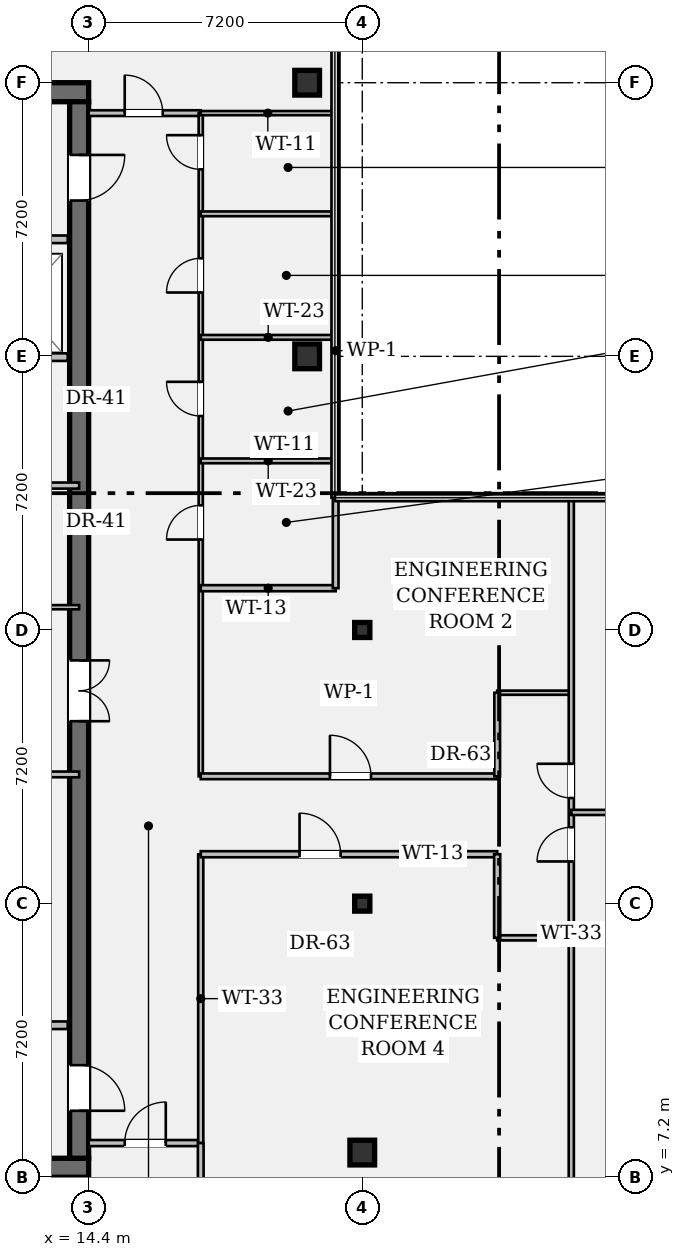
"""IFC4 building model, lengths in metres.
Left out: names, types, materials, properties, quantities, classifications, styles, units other than length and angle.
Written with IfcOpenShell. Run it as: python <this file> out.ifc"""

import sys

from ifc_helpers import new_model, si_unit, direction, frame, frame_2d, origin, origin_2d, place, context, subcontext, project, spatial, rectangle, hollow_rectangle, i_section, extrude, element, fill, save


model = new_model("IFC4")
c1 = context("Model", 3, precision=1e-05, world=origin(), true_north=direction((0.0, 1.0)))
c2 = subcontext(c1, "Body", "Model", "MODEL_VIEW")
j1 = project(units=[si_unit("LENGTHUNIT", "METRE"), si_unit("PLANEANGLEUNIT", "RADIAN")], contexts=[c1])
p1 = place(None, origin())
s1 = spatial("IfcSite", under=j1, at=p1, CompositionType="ELEMENT")
p2 = place(p1, origin())
s2 = spatial("IfcBuilding", under=s1, at=p2, CompositionType="ELEMENT")
p3 = place(p2, frame((0.0, 0.0, 279.65)))
s3 = spatial("IfcBuildingStorey", under=s2, at=p3, CompositionType="ELEMENT", Elevation=279.65)
for number, where, z_axis, x_axis in (
    (1, (0.5, 7.45, 0.0), (0.0, 0.0, 1.0), (1.0, 0.0, 0.0)),
    (2, (0.5, 35.75, 0.0), (0.0, 0.0, 1.0), (1.0, 0.0, 0.0)),
):
    element("IfcWall", number, at=place(p3, frame(where, z_axis=z_axis, x_axis=x_axis)), inside=s3, PredefinedType="SHEAR", context=c2, shape_type="SweptSolid", body=[
        extrude(rectangle(XDim=13.9, YDim=0.5, at=frame_2d((6.95, 0.0))), origin(), (0.0, 0.0, 1.0), 3.24),
    ])
p4 = place(p3, frame((14.15, 35.5, 0.0), z_axis=(0.0, 0.0, 1.0), x_axis=(0.0, -1.0, 0.0)))
e3 = element("IfcWall", 3, at=p4, inside=s3, PredefinedType="SHEAR", context=c2, shape_type="SweptSolid", body=[
    extrude(rectangle(XDim=27.8, YDim=0.5, at=frame_2d((13.9, 0.0))), origin(), (0.0, 0.0, 1.0), 3.24),
])
p5 = place(p4, frame((1.4, 0.0, 0.0)))
e4 = element("IfcOpeningElement", 4, at=p5, cuts=e3, PredefinedType="OPENING", context=c2, shape_type="SweptSolid", body=[
    extrude(rectangle(XDim=1.2, YDim=2.15, at=frame_2d((0.6, 1.075))), frame((0.0, 0.262, 0.0), z_axis=(0.0, -1.0, 0.0), x_axis=(1.0, 0.0, 0.0)), (0.0, 0.0, 1.0), 0.524),
])
p6 = place(p4, frame((25.35, 0.0, 0.0)))
e5 = element("IfcOpeningElement", 5, at=p6, cuts=e3, PredefinedType="OPENING", context=c2, shape_type="SweptSolid", body=[
    extrude(rectangle(XDim=1.2, YDim=2.15, at=frame_2d((0.6, 1.075))), frame((0.0, 0.262, 0.0), z_axis=(0.0, -1.0, 0.0), x_axis=(1.0, 0.0, 0.0)), (0.0, 0.0, 1.0), 0.524),
])
p7 = place(p4, frame((14.7, 0.0, 0.0)))
e6 = element("IfcOpeningElement", 6, at=p7, cuts=e3, PredefinedType="OPENING", context=c2, shape_type="SweptSolid", body=[
    extrude(rectangle(XDim=1.6, YDim=2.2, at=frame_2d((0.8, 1.1))), frame((0.0, 0.262, 0.0), z_axis=(0.0, -1.0, 0.0), x_axis=(1.0, 0.0, 0.0)), (0.0, 0.0, 1.0), 0.524),
])
for number, where, z_axis, x_axis in (
    (7, (20.15, 28.8, 0.0), (0.0, 0.0, 1.0), (1.0, 0.0, 0.0)),
    (8, (20.15, 36.0, 0.0), (0.0, 0.0, 1.0), (1.0, 0.0, 0.0)),
    (9, (21.6, 7.85, 0.0), (0.0, 0.0, 1.0), (1.0, 0.0, 0.0)),
):
    element("IfcColumn", number, at=place(p3, frame(where, z_axis=z_axis, x_axis=x_axis)), inside=s3, PredefinedType="COLUMN", context=c2, shape_type="SweptSolid", body=[
        extrude(hollow_rectangle(XDim=0.65, YDim=0.65, WallThickness=0.04, at=origin_2d()), origin(), (0.0, 0.0, 1.0), 3.24),
    ])
for number, where, z_axis, x_axis in (
    (10, (21.6, 14.4, 0.0), (0.0, 0.0, 1.0), (1.0, 0.0, 0.0)),
    (11, (21.6, 21.6, 0.0), (0.0, 0.0, 1.0), (1.0, 0.0, 0.0)),
):
    element("IfcColumn", number, at=place(p3, frame(where, z_axis=z_axis, x_axis=x_axis)), inside=s3, PredefinedType="COLUMN", context=c2, shape_type="SweptSolid", body=[
        extrude(i_section(OverallWidth=0.399, OverallDepth=0.394, WebThickness=0.023, FlangeThickness=0.037, FilletRadius=0.018, at=origin_2d()), origin(), (0.0, 0.0, 1.0), 3.24),
    ])
p8 = place(p3, frame((8.7, 31.88, 0.0), z_axis=(0.0, 0.0, 1.0), x_axis=(1.0, 0.0, 0.0)))
e12 = element("IfcWall", 12, at=p8, inside=s3, PredefinedType="PARTITIONING", context=c2, shape_type="SweptSolid", body=[
    extrude(rectangle(XDim=5.15, YDim=0.2, at=frame_2d((2.575, 0.0))), origin(), (0.0, 0.0, 1.0), 3.24),
])
p9 = place(p8, frame((0.75, 0.0, 0.0)))
e13 = element("IfcOpeningElement", 13, at=p9, cuts=e12, PredefinedType="OPENING", context=c2, shape_type="SweptSolid", body=[
    extrude(rectangle(XDim=1.2, YDim=2.2, at=frame_2d((0.6, 1.1))), frame((0.0, 0.112, 0.0), z_axis=(0.0, -1.0, 0.0), x_axis=(1.0, 0.0, 0.0)), (0.0, 0.0, 1.0), 0.224),
])
p10 = place(p8, frame((3.25, 0.0, 0.0)))
e14 = element("IfcOpeningElement", 14, at=p10, cuts=e12, PredefinedType="OPENING", context=c2, shape_type="SweptSolid", body=[
    extrude(rectangle(XDim=1.2, YDim=2.2, at=frame_2d((0.6, 1.1))), frame((0.0, 0.112, 0.0), z_axis=(0.0, -1.0, 0.0), x_axis=(1.0, 0.0, 0.0)), (0.0, 0.0, 1.0), 0.224),
])
for number, where, z_axis, x_axis in (
    (15, (8.7, 11.2, 0.0), (0.0, 0.0, 1.0), (1.0, 0.0, 0.0)),
    (16, (8.7, 28.78, 0.0), (0.0, 0.0, 1.0), (1.0, 0.0, 0.0)),
):
    element("IfcWall", number, at=place(p3, frame(where, z_axis=z_axis, x_axis=x_axis)), inside=s3, PredefinedType="PARTITIONING", context=c2, shape_type="SweptSolid", body=[
        extrude(rectangle(XDim=5.15, YDim=0.2, at=frame_2d((2.575, 0.0))), origin(), (0.0, 0.0, 1.0), 3.24),
    ])
p11 = place(p3, frame((7.1, 22.2, 0.0), z_axis=(0.0, 0.0, 1.0), x_axis=(1.0, 0.0, 0.0)))
e17 = element("IfcWall", 17, at=p11, inside=s3, PredefinedType="PARTITIONING", context=c2, shape_type="SweptSolid", body=[
    extrude(rectangle(XDim=7.05, YDim=0.11, at=frame_2d((3.525, 0.0))), origin(), (0.0, 0.0, 1.0), 3.24),
])
p12 = place(p3, frame((7.1, 25.4, 0.0), z_axis=(0.0, 0.0, 1.0), x_axis=(1.0, 0.0, 0.0)))
e18 = element("IfcWall", 18, at=p12, inside=s3, PredefinedType="PARTITIONING", context=c2, shape_type="SweptSolid", body=[
    extrude(rectangle(XDim=7.05, YDim=0.16, at=frame_2d((3.525, 0.0))), origin(), (0.0, 0.0, 1.0), 3.24),
])
p13 = place(p3, frame((5.15, 17.8, 0.0), z_axis=(0.0, 0.0, 1.0), x_axis=(1.0, 0.0, 0.0)))
e19 = element("IfcWall", 19, at=p13, inside=s3, PredefinedType="PARTITIONING", context=c2, shape_type="SweptSolid", body=[
    extrude(rectangle(XDim=9.0, YDim=0.15, at=frame_2d((4.5, 0.0))), origin(), (0.0, 0.0, 1.0), 3.24),
])
p14 = place(p13, frame((4.35, 0.0, 0.0)))
e20 = element("IfcOpeningElement", 20, at=p14, cuts=e19, PredefinedType="OPENING", context=c2, shape_type="SweptSolid", body=[
    extrude(rectangle(XDim=1.0, YDim=2.15, at=frame_2d((0.5, 1.075))), frame((0.0, 0.087, 0.0), z_axis=(0.0, -1.0, 0.0), x_axis=(1.0, 0.0, 0.0)), (0.0, 0.0, 1.0), 0.174),
])
p15 = place(p3, frame((14.4, 8.1, 0.0), z_axis=(0.0, 0.0, 1.0), x_axis=(1.0, 0.0, 0.0)))
e21 = element("IfcWall", 21, at=p15, inside=s3, PredefinedType="PARTITIONING", context=c2, shape_type="SweptSolid", body=[
    extrude(rectangle(XDim=2.95, YDim=0.16, at=frame_2d((1.475, 0.0))), origin(), (0.0, 0.0, 1.0), 3.24),
])
p16 = place(p15, frame((0.95, 0.0, 0.0)))
e22 = element("IfcOpeningElement", 22, at=p16, cuts=e21, PredefinedType="OPENING", context=c2, shape_type="SweptSolid", body=[
    extrude(rectangle(XDim=1.08, YDim=2.15, at=frame_2d((0.54, 1.075))), frame((0.0, 0.092, 0.0), z_axis=(0.0, -1.0, 0.0), x_axis=(1.0, 0.0, 0.0)), (0.0, 0.0, 1.0), 0.184),
])
p17 = place(p3, frame((14.4, 35.2, 0.0), z_axis=(0.0, 0.0, 1.0), x_axis=(1.0, 0.0, 0.0)))
e23 = element("IfcWall", 23, at=p17, inside=s3, PredefinedType="PARTITIONING", context=c2, shape_type="SweptSolid", body=[
    extrude(rectangle(XDim=2.95, YDim=0.15, at=frame_2d((1.475, 0.0))), origin(), (0.0, 0.0, 1.0), 2.808),
])
p18 = place(p17, frame((0.95, 0.0, 0.0)))
e24 = element("IfcOpeningElement", 24, at=p18, cuts=e23, PredefinedType="OPENING", context=c2, shape_type="SweptSolid", body=[
    extrude(rectangle(XDim=1.0, YDim=2.15, at=frame_2d((0.5, 1.075))), frame((0.0, 0.087, 0.0), z_axis=(0.0, -1.0, 0.0), x_axis=(1.0, 0.0, 0.0)), (0.0, 0.0, 1.0), 0.174),
])
p19 = place(p3, frame((17.35, 8.1, 0.0), z_axis=(0.0, 0.0, 1.0), x_axis=(0.0, 1.0, 0.0)))
e25 = element("IfcWall", 25, at=p19, inside=s3, PredefinedType="PARTITIONING", context=c2, shape_type="SweptSolid", body=[
    extrude(rectangle(XDim=7.6, YDim=0.135, at=frame_2d((3.8, 0.0))), origin(), (0.0, 0.0, 1.0), 2.676),
])
p20 = place(p3, frame((17.35, 17.75, 0.0), z_axis=(0.0, 0.0, 1.0), x_axis=(0.0, 1.0, 0.0)))
e26 = element("IfcWall", 26, at=p20, inside=s3, PredefinedType="PARTITIONING", context=c2, shape_type="SweptSolid", body=[
    extrude(rectangle(XDim=17.45, YDim=0.11, at=frame_2d((8.725, 0.0))), origin(), (0.0, 0.0, 1.0), 2.676),
])
p21 = place(p20, frame((6.23, 0.0, 0.0)))
e27 = element("IfcOpeningElement", 27, at=p21, cuts=e26, PredefinedType="OPENING", context=c2, shape_type="SweptSolid", body=[
    extrude(rectangle(XDim=0.9, YDim=2.15, at=frame_2d((0.45, 1.075))), frame((0.0, 0.067, 0.0), z_axis=(0.0, -1.0, 0.0), x_axis=(1.0, 0.0, 0.0)), (0.0, 0.0, 1.0), 0.134),
])
p22 = place(p20, frame((9.48, 0.0, 0.0)))
e28 = element("IfcOpeningElement", 28, at=p22, cuts=e26, PredefinedType="OPENING", context=c2, shape_type="SweptSolid", body=[
    extrude(rectangle(XDim=0.9, YDim=2.15, at=frame_2d((0.45, 1.075))), frame((0.0, 0.067, 0.0), z_axis=(0.0, -1.0, 0.0), x_axis=(1.0, 0.0, 0.0)), (0.0, 0.0, 1.0), 0.134),
])
p23 = place(p20, frame((12.73, 0.0, 0.0)))
e29 = element("IfcOpeningElement", 29, at=p23, cuts=e26, PredefinedType="OPENING", context=c2, shape_type="SweptSolid", body=[
    extrude(rectangle(XDim=0.9, YDim=2.15, at=frame_2d((0.45, 1.075))), frame((0.0, 0.067, 0.0), z_axis=(0.0, -1.0, 0.0), x_axis=(1.0, 0.0, 0.0)), (0.0, 0.0, 1.0), 0.134),
])
p24 = place(p20, frame((15.97, 0.0, 0.0)))
e30 = element("IfcOpeningElement", 30, at=p24, cuts=e26, PredefinedType="OPENING", context=c2, shape_type="SweptSolid", body=[
    extrude(rectangle(XDim=0.9, YDim=2.15, at=frame_2d((0.45, 1.075))), frame((0.0, 0.067, 0.0), z_axis=(0.0, -1.0, 0.0), x_axis=(1.0, 0.0, 0.0)), (0.0, 0.0, 1.0), 0.134),
])
p25 = place(p3, frame((17.35, 15.7, 0.0), z_axis=(0.0, 0.0, 1.0), x_axis=(1.0, 0.0, 0.0)))
e31 = element("IfcWall", 31, at=p25, inside=s3, PredefinedType="PARTITIONING", context=c2, shape_type="SweptSolid", body=[
    extrude(rectangle(XDim=7.8, YDim=0.16, at=frame_2d((3.9, 0.0))), origin(), (0.0, 0.0, 1.0), 2.676),
])
p26 = place(p25, frame((2.6, 0.0, 0.0)))
e32 = element("IfcOpeningElement", 32, at=p26, cuts=e31, PredefinedType="OPENING", context=c2, shape_type="SweptSolid", body=[
    extrude(rectangle(XDim=1.08, YDim=2.15, at=frame_2d((0.54, 1.075))), frame((0.0, 0.092, 0.0), z_axis=(0.0, -1.0, 0.0), x_axis=(1.0, 0.0, 0.0)), (0.0, 0.0, 1.0), 0.184),
])
p27 = place(p3, frame((17.35, 17.75, 0.0), z_axis=(0.0, 0.0, 1.0), x_axis=(1.0, 0.0, 0.0)))
e33 = element("IfcWall", 33, at=p27, inside=s3, PredefinedType="PARTITIONING", context=c2, shape_type="SweptSolid", body=[
    extrude(rectangle(XDim=7.8, YDim=0.15, at=frame_2d((3.9, 0.0))), origin(), (0.0, 0.0, 1.0), 2.676),
])
p28 = place(p27, frame((3.4, 0.0, 0.0)))
e34 = element("IfcOpeningElement", 34, at=p28, cuts=e33, PredefinedType="OPENING", context=c2, shape_type="SweptSolid", body=[
    extrude(rectangle(XDim=1.08, YDim=2.15, at=frame_2d((0.54, 1.075))), frame((0.0, 0.087, 0.0), z_axis=(0.0, -1.0, 0.0), x_axis=(1.0, 0.0, 0.0)), (0.0, 0.0, 1.0), 0.174),
])
p29 = place(p3, frame((25.15, 13.5, 0.0), z_axis=(0.0, 0.0, 1.0), x_axis=(1.0, 0.0, 0.0)))
e35 = element("IfcWall", 35, at=p29, inside=s3, PredefinedType="PARTITIONING", context=c2, shape_type="SweptSolid", body=[
    extrude(rectangle(XDim=1.95, YDim=0.135, at=frame_2d((0.975, 0.0))), origin(), (0.0, 0.0, 1.0), 2.808),
])
p30 = place(p3, frame((25.15, 19.95, 0.0), z_axis=(0.0, 0.0, 1.0), x_axis=(1.0, 0.0, 0.0)))
e36 = element("IfcWall", 36, at=p30, inside=s3, PredefinedType="PARTITIONING", context=c2, shape_type="SweptSolid", body=[
    extrude(rectangle(XDim=1.95, YDim=0.11, at=frame_2d((0.975, 0.0))), origin(), (0.0, 0.0, 1.0), 2.808),
])
p31 = place(p3, frame((25.15, 13.5, 0.0), z_axis=(0.0, 0.0, 1.0), x_axis=(0.0, 1.0, 0.0)))
e37 = element("IfcWall", 37, at=p31, inside=s3, PredefinedType="PARTITIONING", context=c2, shape_type="SweptSolid", body=[
    extrude(rectangle(XDim=2.2, YDim=0.16, at=frame_2d((1.1, 0.0))), origin(), (0.0, 0.0, 1.0), 2.676),
])
p32 = place(p3, frame((25.15, 17.75, 0.0), z_axis=(0.0, 0.0, 1.0), x_axis=(0.0, 1.0, 0.0)))
e38 = element("IfcWall", 38, at=p32, inside=s3, PredefinedType="PARTITIONING", context=c2, shape_type="SweptSolid", body=[
    extrude(rectangle(XDim=2.2, YDim=0.15, at=frame_2d((1.1, 0.0))), origin(), (0.0, 0.0, 1.0), 3.24),
])
p33 = place(p3, frame((27.1, 6.52, 0.0), z_axis=(0.0, 0.0, 1.0), x_axis=(0.0, 1.0, 0.0)))
e39 = element("IfcWall", 39, at=p33, inside=s3, PredefinedType="PARTITIONING", context=c2, shape_type="SweptSolid", body=[
    extrude(rectangle(XDim=18.56, YDim=0.135, at=frame_2d((9.28, 0.0))), origin(), (0.0, 0.0, 1.0), 2.676),
])
p34 = place(p33, frame((8.99, 0.0, 0.0)))
e40 = element("IfcOpeningElement", 40, at=p34, cuts=e39, PredefinedType="OPENING", context=c2, shape_type="SweptSolid", body=[
    extrude(rectangle(XDim=0.9, YDim=2.15, at=frame_2d((0.45, 1.075))), frame((0.0, 0.08, 0.0), z_axis=(0.0, -1.0, 0.0), x_axis=(1.0, 0.0, 0.0)), (0.0, 0.0, 1.0), 0.159),
])
p35 = place(p33, frame((10.66, 0.0, 0.0)))
e41 = element("IfcOpeningElement", 41, at=p35, cuts=e39, PredefinedType="OPENING", context=c2, shape_type="SweptSolid", body=[
    extrude(rectangle(XDim=0.9, YDim=2.15, at=frame_2d((0.45, 1.075))), frame((0.0, 0.08, 0.0), z_axis=(0.0, -1.0, 0.0), x_axis=(1.0, 0.0, 0.0)), (0.0, 0.0, 1.0), 0.159),
])
p36 = place(p3, frame((17.35, 35.2, 0.0), z_axis=(0.0, 0.0, 1.0), x_axis=(1.0, 0.0, 0.0)))
e42 = element("IfcWall", 42, at=p36, inside=s3, PredefinedType="PARTITIONING", context=c2, shape_type="SweptSolid", body=[
    extrude(rectangle(XDim=3.53, YDim=0.11, at=frame_2d((1.765, 0.0))), origin(), (0.0, 0.0, 1.0), 2.808),
])
p37 = place(p3, frame((17.35, 22.7, 0.0), z_axis=(0.0, 0.0, 1.0), x_axis=(1.0, 0.0, 0.0)))
e43 = element("IfcWall", 43, at=p37, inside=s3, PredefinedType="PARTITIONING", context=c2, shape_type="SweptSolid", body=[
    extrude(rectangle(XDim=3.55, YDim=0.16, at=frame_2d((1.775, 0.0))), origin(), (0.0, 0.0, 1.0), 2.808),
])
p38 = place(p3, frame((20.9, 22.7, 0.0), z_axis=(0.0, 0.0, 1.0), x_axis=(0.0, 1.0, 0.0)))
e44 = element("IfcWall", 44, at=p38, inside=s3, PredefinedType="PARTITIONING", context=c2, shape_type="SweptSolid", body=[
    extrude(rectangle(XDim=12.5, YDim=0.15, at=frame_2d((6.25, 0.0))), origin(), (0.0, 0.0, 1.0), 3.24),
])
for number, where, z_axis, x_axis in (
    (45, (17.35, 26.05, 0.0), (0.0, 0.0, 1.0), (1.0, 0.0, 0.0)),
    (46, (17.35, 29.3, 0.0), (0.0, 0.0, 1.0), (1.0, 0.0, 0.0)),
    (47, (17.35, 32.55, 0.0), (0.0, 0.0, 1.0), (1.0, 0.0, 0.0)),
):
    element("IfcWall", number, at=place(p3, frame(where, z_axis=z_axis, x_axis=x_axis)), inside=s3, PredefinedType="PARTITIONING", context=c2, shape_type="SweptSolid", body=[
        extrude(rectangle(XDim=3.55, YDim=0.125, at=frame_2d((1.775, 0.0))), origin(), (0.0, 0.0, 1.0), 2.808),
    ])
p39 = place(p3, frame((17.35, 6.52, 0.0), z_axis=(0.0, 0.0, 1.0), x_axis=(0.0, 1.0, 0.0)))
e48 = element("IfcWall", 48, at=p39, inside=s3, PredefinedType="PARTITIONING", context=c2, shape_type="SweptSolid", body=[
    extrude(rectangle(XDim=1.58, YDim=0.15, at=frame_2d((0.79, 0.0))), origin(), (0.0, 0.0, 1.0), 3.24),
])
p40 = place(p3, frame((27.1, 16.8, 0.0), z_axis=(0.0, 0.0, 1.0), x_axis=(1.0, 0.0, 0.0)))
e49 = element("IfcWall", 49, at=p40, inside=s3, PredefinedType="PARTITIONING", context=c2, shape_type="SweptSolid", body=[
    extrude(rectangle(XDim=18.38, YDim=0.135, at=frame_2d((9.19, 0.0))), origin(), (0.0, 0.0, 1.0), 2.676),
])
p41 = place(p5, origin())
e50 = element("IfcDoor", 50, at=p41, inside=s3, OperationType="SINGLE_SWING_LEFT", PredefinedType="DOOR", context=c2, shape_type="SweptSolid", body=[
    extrude(rectangle(XDim=1.2, YDim=2.15, at=frame_2d((0.6, 1.075))), frame((0.0, 0.025, 0.0), z_axis=(0.0, -1.0, 0.0), x_axis=(1.0, 0.0, 0.0)), (0.0, 0.0, 1.0), 0.05),
])
fill(e4, e50)
p42 = place(p6, origin())
e51 = element("IfcDoor", 51, at=p42, inside=s3, OperationType="SINGLE_SWING_RIGHT", PredefinedType="DOOR", context=c2, shape_type="SweptSolid", body=[
    extrude(rectangle(XDim=1.2, YDim=2.15, at=frame_2d((0.6, 1.075))), frame((0.0, 0.025, 0.0), z_axis=(0.0, -1.0, 0.0), x_axis=(1.0, 0.0, 0.0)), (0.0, 0.0, 1.0), 0.05),
])
fill(e5, e51)
p43 = place(p7, origin())
e52 = element("IfcDoor", 52, at=p43, inside=s3, OperationType="DOUBLE_DOOR_SINGLE_SWING", PredefinedType="DOOR", context=c2, shape_type="SweptSolid", body=[
    extrude(rectangle(XDim=1.6, YDim=2.2, at=frame_2d((0.8, 1.1))), frame((0.0, 0.025, 0.0), z_axis=(0.0, -1.0, 0.0), x_axis=(1.0, 0.0, 0.0)), (0.0, 0.0, 1.0), 0.05),
])
fill(e6, e52)
p44 = place(p18, origin())
e53 = element("IfcDoor", 53, at=p44, inside=s3, OperationType="SINGLE_SWING_LEFT", PredefinedType="DOOR", context=c2, shape_type="SweptSolid", body=[
    extrude(rectangle(XDim=1.0, YDim=2.15, at=frame_2d((0.5, 1.075))), frame((0.0, 0.025, 0.0), z_axis=(0.0, -1.0, 0.0), x_axis=(1.0, 0.0, 0.0)), (0.0, 0.0, 1.0), 0.05),
])
fill(e24, e53)
p45 = place(p21, origin())
e54 = element("IfcDoor", 54, at=p45, inside=s3, OperationType="SINGLE_SWING_LEFT", PredefinedType="DOOR", context=c2, shape_type="SweptSolid", body=[
    extrude(rectangle(XDim=0.9, YDim=2.15, at=frame_2d((0.45, 1.075))), frame((0.0, 0.025, 0.0), z_axis=(0.0, -1.0, 0.0), x_axis=(1.0, 0.0, 0.0)), (0.0, 0.0, 1.0), 0.05),
])
fill(e27, e54)
p46 = place(p22, origin())
e55 = element("IfcDoor", 55, at=p46, inside=s3, OperationType="SINGLE_SWING_RIGHT", PredefinedType="DOOR", context=c2, shape_type="SweptSolid", body=[
    extrude(rectangle(XDim=0.9, YDim=2.15, at=frame_2d((0.45, 1.075))), frame((0.0, 0.025, 0.0), z_axis=(0.0, -1.0, 0.0), x_axis=(1.0, 0.0, 0.0)), (0.0, 0.0, 1.0), 0.05),
])
fill(e28, e55)
p47 = place(p23, origin())
e56 = element("IfcDoor", 56, at=p47, inside=s3, OperationType="SINGLE_SWING_LEFT", PredefinedType="DOOR", context=c2, shape_type="SweptSolid", body=[
    extrude(rectangle(XDim=0.9, YDim=2.15, at=frame_2d((0.45, 1.075))), frame((0.0, 0.025, 0.0), z_axis=(0.0, -1.0, 0.0), x_axis=(1.0, 0.0, 0.0)), (0.0, 0.0, 1.0), 0.05),
])
fill(e29, e56)
p48 = place(p24, origin())
e57 = element("IfcDoor", 57, at=p48, inside=s3, OperationType="SINGLE_SWING_RIGHT", PredefinedType="DOOR", context=c2, shape_type="SweptSolid", body=[
    extrude(rectangle(XDim=0.9, YDim=2.15, at=frame_2d((0.45, 1.075))), frame((0.0, 0.025, 0.0), z_axis=(0.0, -1.0, 0.0), x_axis=(1.0, 0.0, 0.0)), (0.0, 0.0, 1.0), 0.05),
])
fill(e30, e57)
p49 = place(p28, origin())
e58 = element("IfcDoor", 58, at=p49, inside=s3, OperationType="SINGLE_SWING_LEFT", PredefinedType="DOOR", context=c2, shape_type="SweptSolid", body=[
    extrude(rectangle(XDim=1.08, YDim=2.15, at=frame_2d((0.54, 1.075))), frame((0.0, 0.025, 0.0), z_axis=(0.0, -1.0, 0.0), x_axis=(1.0, 0.0, 0.0)), (0.0, 0.0, 1.0), 0.05),
])
fill(e34, e58)
p50 = place(p16, origin())
e59 = element("IfcDoor", 59, at=p50, inside=s3, OperationType="SINGLE_SWING_RIGHT", PredefinedType="DOOR", context=c2, shape_type="SweptSolid", body=[
    extrude(rectangle(XDim=1.08, YDim=2.15, at=frame_2d((0.54, 1.075))), frame((0.0, 0.025, 0.0), z_axis=(0.0, -1.0, 0.0), x_axis=(1.0, 0.0, 0.0)), (0.0, 0.0, 1.0), 0.05),
])
fill(e22, e59)
p51 = place(p26, origin())
e60 = element("IfcDoor", 60, at=p51, inside=s3, OperationType="SINGLE_SWING_LEFT", PredefinedType="DOOR", context=c2, shape_type="SweptSolid", body=[
    extrude(rectangle(XDim=1.08, YDim=2.15, at=frame_2d((0.54, 1.075))), frame((0.0, 0.025, 0.0), z_axis=(0.0, -1.0, 0.0), x_axis=(1.0, 0.0, 0.0)), (0.0, 0.0, 1.0), 0.05),
])
fill(e32, e60)
p52 = place(p34, origin())
e61 = element("IfcDoor", 61, at=p52, inside=s3, OperationType="SINGLE_SWING_LEFT", PredefinedType="DOOR", context=c2, shape_type="SweptSolid", body=[
    extrude(rectangle(XDim=0.9, YDim=2.15, at=frame_2d((0.45, 1.075))), frame((0.0, 0.025, 0.0), z_axis=(0.0, -1.0, 0.0), x_axis=(1.0, 0.0, 0.0)), (0.0, 0.0, 1.0), 0.05),
])
fill(e40, e61)
p53 = place(p35, origin())
e62 = element("IfcDoor", 62, at=p53, inside=s3, OperationType="SINGLE_SWING_RIGHT", PredefinedType="DOOR", context=c2, shape_type="SweptSolid", body=[
    extrude(rectangle(XDim=0.9, YDim=2.15, at=frame_2d((0.45, 1.075))), frame((0.0, 0.025, 0.0), z_axis=(0.0, -1.0, 0.0), x_axis=(1.0, 0.0, 0.0)), (0.0, 0.0, 1.0), 0.05),
])
fill(e41, e62)
save(model, sys.argv[1])
